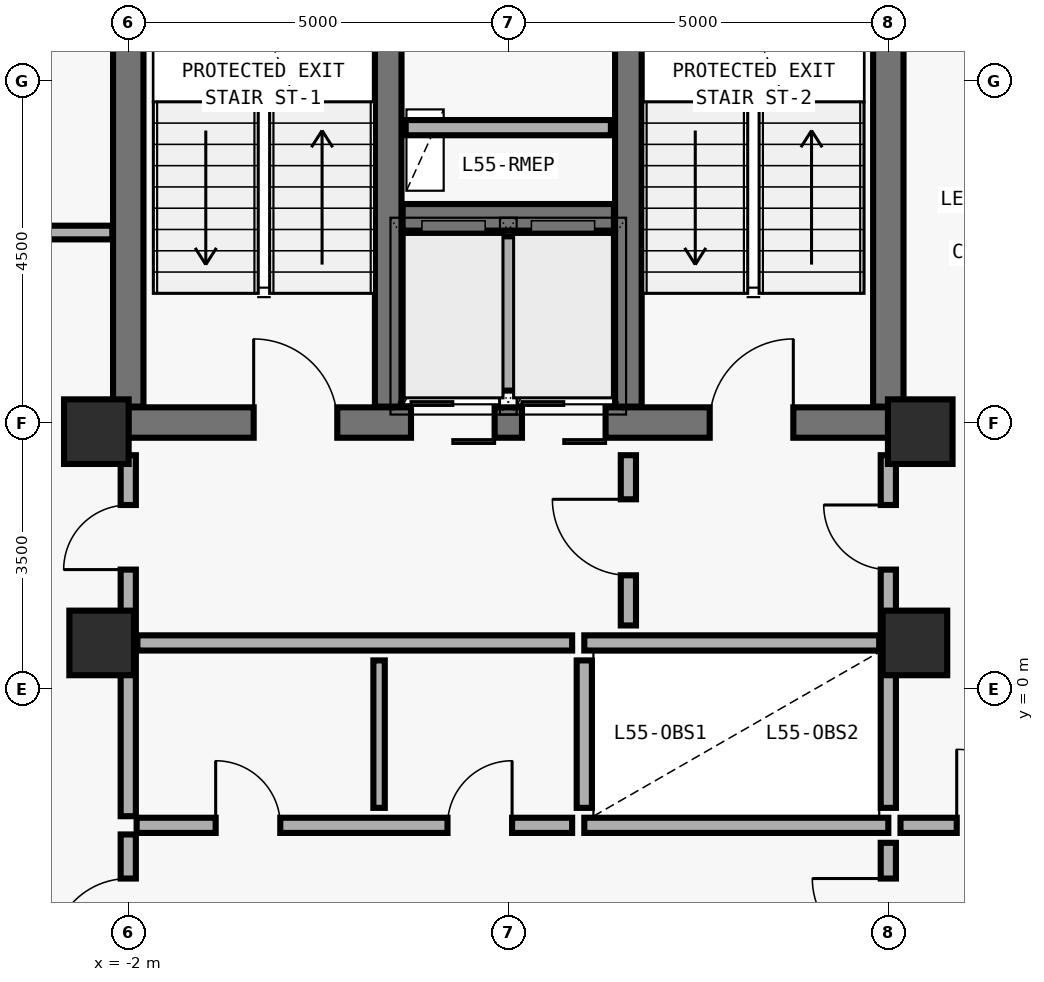
"""IFC4 building model, lengths in metres.
Left out: names, types, materials, properties, quantities, classifications, styles, units other than length and angle.
Written with IfcOpenShell. Run it as: python <this file> out.ifc"""

import sys

from ifc_helpers import new_model, si_unit, direction, frame, frame_2d, origin, origin_2d, place, context, subcontext, project, spatial, rectangle, extrude, element, fill, save


model = new_model("IFC4")
c1 = context("Model", 3, precision=1e-05, world=origin(), true_north=direction((0.0, 1.0)))
c2 = subcontext(c1, "Body", "Model", "MODEL_VIEW")
j1 = project(units=[si_unit("LENGTHUNIT", "METRE"), si_unit("PLANEANGLEUNIT", "RADIAN")], contexts=[c1])
p1 = place(None, origin())
s1 = spatial("IfcSite", under=j1, at=p1, CompositionType="ELEMENT")
p2 = place(p1, origin())
s2 = spatial("IfcBuilding", under=s1, at=p2, CompositionType="ELEMENT")
p3 = place(p2, frame((0.0, 0.0, 218.4)))
s3 = spatial("IfcBuildingStorey", under=s2, at=p3, CompositionType="ELEMENT", Elevation=218.4)
p4 = place(p3, frame((-2.0, 3.5, 0.0), z_axis=(0.0, 0.0, 1.0), x_axis=(1.0, 0.0, 0.0)))
e1 = element("IfcWall", 1, at=p4, inside=s3, PredefinedType="SHEAR", context=c2, shape_type="SweptSolid", body=[
    extrude(rectangle(XDim=10.0, YDim=0.4, at=frame_2d((5.0, 0.0))), origin(), (0.0, 0.0, 1.0), 3.592),
])
p5 = place(p4, frame((1.65, 0.0, 0.0)))
e2 = element("IfcOpeningElement", 2, at=p5, cuts=e1, PredefinedType="OPENING", context=c2, shape_type="SweptSolid", body=[
    extrude(rectangle(XDim=1.1, YDim=2.15, at=frame_2d((0.55, 1.075))), frame((0.0, 0.21, 0.0), z_axis=(0.0, -1.0, 0.0), x_axis=(1.0, 0.0, 0.0)), (0.0, 0.0, 1.0), 0.42),
])
p6 = place(p4, frame((7.65, 0.0, 0.0)))
e3 = element("IfcOpeningElement", 3, at=p6, cuts=e1, PredefinedType="OPENING", context=c2, shape_type="SweptSolid", body=[
    extrude(rectangle(XDim=1.1, YDim=2.15, at=frame_2d((0.55, 1.075))), frame((0.0, 0.21, 0.0), z_axis=(0.0, -1.0, 0.0), x_axis=(1.0, 0.0, 0.0)), (0.0, 0.0, 1.0), 0.42),
])
p7 = place(p4, frame((3.72, 0.0, 0.0)))
e4 = element("IfcOpeningElement", 4, at=p7, cuts=e1, PredefinedType="OPENING", context=c2, shape_type="SweptSolid", body=[
    extrude(rectangle(XDim=1.1, YDim=2.2, at=frame_2d((0.55, 1.1))), frame((0.0, 0.21, 0.0), z_axis=(0.0, -1.0, 0.0), x_axis=(1.0, 0.0, 0.0)), (0.0, 0.0, 1.0), 0.42),
])
p8 = place(p4, frame((5.18, 0.0, 0.0)))
e5 = element("IfcOpeningElement", 5, at=p8, cuts=e1, PredefinedType="OPENING", context=c2, shape_type="SweptSolid", body=[
    extrude(rectangle(XDim=1.1, YDim=2.2, at=frame_2d((0.55, 1.1))), frame((0.0, 0.21, 0.0), z_axis=(0.0, -1.0, 0.0), x_axis=(1.0, 0.0, 0.0)), (0.0, 0.0, 1.0), 0.42),
])
for number, where, z_axis, x_axis in (
    (6, (-2.0, 3.71, 0.0), (0.0, 0.0, 1.0), (0.0, 1.0, 0.0)),
    (7, (8.0, 3.71, 0.0), (0.0, 0.0, 1.0), (0.0, 1.0, 0.0)),
):
    element("IfcWall", number, at=place(p3, frame(where, z_axis=z_axis, x_axis=x_axis)), inside=s3, PredefinedType="SHEAR", context=c2, shape_type="SweptSolid", body=[
        extrude(rectangle(XDim=8.58, YDim=0.4, at=frame_2d((4.29, 0.0))), origin(), (0.0, 0.0, 1.0), 3.592),
    ])
for number, where, z_axis, x_axis in (
    (8, (1.42, 3.71, 0.0), (0.0, 0.0, 1.0), (0.0, 1.0, 0.0)),
    (9, (4.58, 3.71, 0.0), (0.0, 0.0, 1.0), (0.0, 1.0, 0.0)),
):
    element("IfcWall", number, at=place(p3, frame(where, z_axis=z_axis, x_axis=x_axis)), inside=s3, PredefinedType="SHEAR", context=c2, shape_type="SweptSolid", body=[
        extrude(rectangle(XDim=8.58, YDim=0.35, at=frame_2d((4.29, 0.0))), origin(), (0.0, 0.0, 1.0), 3.592),
    ])
p9 = place(p3, frame((1.61, 6.2, 0.0), z_axis=(0.0, 0.0, 1.0), x_axis=(1.0, 0.0, 0.0)))
e10 = element("IfcWall", 10, at=p9, inside=s3, PredefinedType="SHEAR", context=c2, shape_type="SweptSolid", body=[
    extrude(rectangle(XDim=2.78, YDim=0.35, at=frame_2d((1.39, 0.0))), origin(), (0.0, 0.0, 1.0), 3.592),
])
for number, where, z_axis, x_axis in (
    (11, (-2.42, 3.38, 0.0), (0.0, 0.0, 1.0), (1.0, 0.0, 0.0)),
    (12, (8.42, 3.38, 0.0), (0.0, 0.0, 1.0), (1.0, 0.0, 0.0)),
    (13, (-2.35, 0.6, 0.0), (0.0, 0.0, 1.0), (1.0, 0.0, 0.0)),
    (14, (8.35, 0.6, 0.0), (0.0, 0.0, 1.0), (1.0, 0.0, 0.0)),
):
    element("IfcColumn", number, at=place(p3, frame(where, z_axis=z_axis, x_axis=x_axis)), inside=s3, PredefinedType="COLUMN", context=c2, shape_type="SweptSolid", body=[
        extrude(rectangle(XDim=0.85, YDim=0.85, at=origin_2d()), origin(), (0.0, 0.0, 1.0), 3.575),
    ])
p10 = place(p3, frame((3.0, 3.92, 0.0), z_axis=(0.0, 0.0, 1.0), x_axis=(0.0, 1.0, 0.0)))
e15 = element("IfcWall", 15, at=p10, inside=s3, PredefinedType="SOLIDWALL", context=c2, shape_type="SweptSolid", body=[
    extrude(rectangle(XDim=2.03, YDim=0.2, at=frame_2d((1.015, 0.0))), origin(), (0.0, 0.0, 1.0), 3.36),
])
p11 = place(p3, frame((1.65, 7.38, 0.0), z_axis=(0.0, 0.0, 1.0), x_axis=(1.0, 0.0, 0.0)))
e16 = element("IfcWall", 16, at=p11, inside=s3, PredefinedType="SOLIDWALL", context=c2, shape_type="SweptSolid", body=[
    extrude(rectangle(XDim=2.7, YDim=0.2, at=frame_2d((1.35, 0.0))), origin(), (0.0, 0.0, 1.0), 3.36),
])
p12 = place(p3, frame((4.0, 0.6, 0.0), z_axis=(0.0, 0.0, 1.0), x_axis=(1.0, 0.0, 0.0)))
e17 = element("IfcWall", 17, at=p12, inside=s3, PredefinedType="SOLIDWALL", context=c2, shape_type="SweptSolid", body=[
    extrude(rectangle(XDim=3.88, YDim=0.2, at=frame_2d((1.94, 0.0))), origin(), (0.0, 0.0, 1.0), 3.012),
])
p13 = place(p3, frame((4.0, -1.8, 0.0), z_axis=(0.0, 0.0, 1.0), x_axis=(1.0, 0.0, 0.0)))
e18 = element("IfcWall", 18, at=p13, inside=s3, PredefinedType="SOLIDWALL", context=c2, shape_type="SweptSolid", body=[
    extrude(rectangle(XDim=4.0, YDim=0.2, at=frame_2d((2.0, 0.0))), origin(), (0.0, 0.0, 1.0), 3.36),
])
p14 = place(p3, frame((4.0, -1.57, 0.0), z_axis=(0.0, 0.0, 1.0), x_axis=(0.0, 1.0, 0.0)))
e19 = element("IfcWall", 19, at=p14, inside=s3, PredefinedType="SOLIDWALL", context=c2, shape_type="SweptSolid", body=[
    extrude(rectangle(XDim=1.94, YDim=0.2, at=frame_2d((0.97, 0.0))), origin(), (0.0, 0.0, 1.0), 3.36),
])
p15 = place(p3, frame((8.0, -1.57, 0.0), z_axis=(0.0, 0.0, 1.0), x_axis=(0.0, 1.0, 0.0)))
e20 = element("IfcWall", 20, at=p15, inside=s3, PredefinedType="SOLIDWALL", context=c2, shape_type="SweptSolid", body=[
    extrude(rectangle(XDim=2.05, YDim=0.2, at=frame_2d((1.025, 0.0))), origin(), (0.0, 0.0, 1.0), 3.012),
])
p16 = place(p3, frame((4.58, 0.83, 0.0), z_axis=(0.0, 0.0, 1.0), x_axis=(0.0, 1.0, 0.0)))
e21 = element("IfcWall", 21, at=p16, inside=s3, PredefinedType="MOVABLE", context=c2, shape_type="SweptSolid", body=[
    extrude(rectangle(XDim=2.24, YDim=0.2, at=frame_2d((1.12, 0.0))), origin(), (0.0, 0.0, 1.0), 3.36),
])
p17 = place(p16, frame((0.66, 0.0, 0.0)))
e22 = element("IfcOpeningElement", 22, at=p17, cuts=e21, PredefinedType="OPENING", context=c2, shape_type="SweptSolid", body=[
    extrude(rectangle(XDim=1.0, YDim=2.1, at=frame_2d((0.5, 1.05))), frame((0.0, 0.11, 0.0), z_axis=(0.0, -1.0, 0.0), x_axis=(1.0, 0.0, 0.0)), (0.0, 0.0, 1.0), 0.22),
])
p18 = place(p3, frame((-2.0, 0.72, 0.0), z_axis=(0.0, 0.0, 1.0), x_axis=(0.0, 1.0, 0.0)))
e23 = element("IfcWall", 23, at=p18, inside=s3, PredefinedType="MOVABLE", context=c2, shape_type="SweptSolid", body=[
    extrude(rectangle(XDim=2.35, YDim=0.2, at=frame_2d((1.175, 0.0))), origin(), (0.0, 0.0, 1.0), 2.692),
])
p19 = place(p18, frame((0.845, 0.0, 0.0)))
e24 = element("IfcOpeningElement", 24, at=p19, cuts=e23, PredefinedType="OPENING", context=c2, shape_type="SweptSolid", body=[
    extrude(rectangle(XDim=0.85, YDim=2.1, at=frame_2d((0.425, 1.05))), frame((0.0, 0.11, 0.0), z_axis=(0.0, -1.0, 0.0), x_axis=(1.0, 0.0, 0.0)), (0.0, 0.0, 1.0), 0.22),
])
p20 = place(p3, frame((8.0, 0.72, 0.0), z_axis=(0.0, 0.0, 1.0), x_axis=(0.0, 1.0, 0.0)))
e25 = element("IfcWall", 25, at=p20, inside=s3, PredefinedType="MOVABLE", context=c2, shape_type="SweptSolid", body=[
    extrude(rectangle(XDim=2.35, YDim=0.2, at=frame_2d((1.175, 0.0))), origin(), (0.0, 0.0, 1.0), 2.692),
])
p21 = place(p20, frame((0.845, 0.0, 0.0)))
e26 = element("IfcOpeningElement", 26, at=p21, cuts=e25, PredefinedType="OPENING", context=c2, shape_type="SweptSolid", body=[
    extrude(rectangle(XDim=0.85, YDim=2.1, at=frame_2d((0.425, 1.05))), frame((0.0, 0.11, 0.0), z_axis=(0.0, -1.0, 0.0), x_axis=(1.0, 0.0, 0.0)), (0.0, 0.0, 1.0), 0.22),
])
p22 = place(p3, frame((-2.0, -4.08, 0.0), z_axis=(0.0, 0.0, 1.0), x_axis=(0.0, 1.0, 0.0)))
e27 = element("IfcWall", 27, at=p22, inside=s3, PredefinedType="MOVABLE", context=c2, shape_type="SweptSolid", body=[
    extrude(rectangle(XDim=2.16, YDim=0.2, at=frame_2d((1.08, 0.0))), origin(), (0.0, 0.0, 1.0), 3.012),
])
p23 = place(p22, frame((0.58, 0.0, 0.0)))
e28 = element("IfcOpeningElement", 28, at=p23, cuts=e27, PredefinedType="OPENING", context=c2, shape_type="SweptSolid", body=[
    extrude(rectangle(XDim=1.0, YDim=2.1, at=frame_2d((0.5, 1.05))), frame((0.0, 0.11, 0.0), z_axis=(0.0, -1.0, 0.0), x_axis=(1.0, 0.0, 0.0)), (0.0, 0.0, 1.0), 0.22),
])
p24 = place(p3, frame((8.0, -3.97, 0.0), z_axis=(0.0, 0.0, 1.0), x_axis=(0.0, 1.0, 0.0)))
e29 = element("IfcWall", 29, at=p24, inside=s3, PredefinedType="MOVABLE", context=c2, shape_type="SweptSolid", body=[
    extrude(rectangle(XDim=1.94, YDim=0.2, at=frame_2d((0.97, 0.0))), origin(), (0.0, 0.0, 1.0), 3.012),
])
p25 = place(p24, frame((0.47, 0.0, 0.0)))
e30 = element("IfcOpeningElement", 30, at=p25, cuts=e29, PredefinedType="OPENING", context=c2, shape_type="SweptSolid", body=[
    extrude(rectangle(XDim=1.0, YDim=2.1, at=frame_2d((0.5, 1.05))), frame((0.0, 0.11, 0.0), z_axis=(0.0, -1.0, 0.0), x_axis=(1.0, 0.0, 0.0)), (0.0, 0.0, 1.0), 0.22),
])
p26 = place(p3, frame((-1.89, -1.8, 0.0), z_axis=(0.0, 0.0, 1.0), x_axis=(1.0, 0.0, 0.0)))
e31 = element("IfcWall", 31, at=p26, inside=s3, PredefinedType="MOVABLE", context=c2, shape_type="SweptSolid", body=[
    extrude(rectangle(XDim=5.73, YDim=0.2, at=frame_2d((2.865, 0.0))), origin(), (0.0, 0.0, 1.0), 3.36),
])
p27 = place(p26, frame((1.04, 0.0, 0.0)))
e32 = element("IfcOpeningElement", 32, at=p27, cuts=e31, PredefinedType="OPENING", context=c2, shape_type="SweptSolid", body=[
    extrude(rectangle(XDim=0.85, YDim=2.1, at=frame_2d((0.425, 1.05))), frame((0.0, 0.11, 0.0), z_axis=(0.0, -1.0, 0.0), x_axis=(1.0, 0.0, 0.0)), (0.0, 0.0, 1.0), 0.22),
])
p28 = place(p26, frame((4.09, 0.0, 0.0)))
e33 = element("IfcOpeningElement", 33, at=p28, cuts=e31, PredefinedType="OPENING", context=c2, shape_type="SweptSolid", body=[
    extrude(rectangle(XDim=0.85, YDim=2.1, at=frame_2d((0.425, 1.05))), frame((0.0, 0.11, 0.0), z_axis=(0.0, -1.0, 0.0), x_axis=(1.0, 0.0, 0.0)), (0.0, 0.0, 1.0), 0.22),
])
p29 = place(p3, frame((8.16, -1.8, 0.0), z_axis=(0.0, 0.0, 1.0), x_axis=(1.0, 0.0, 0.0)))
e34 = element("IfcWall", 34, at=p29, inside=s3, PredefinedType="MOVABLE", context=c2, shape_type="SweptSolid", body=[
    extrude(rectangle(XDim=2.64, YDim=0.2, at=frame_2d((1.32, 0.0))), origin(), (0.0, 0.0, 1.0), 3.36),
])
p30 = place(p29, frame((0.74, 0.0, 0.0)))
e35 = element("IfcOpeningElement", 35, at=p30, cuts=e34, PredefinedType="OPENING", context=c2, shape_type="SweptSolid", body=[
    extrude(rectangle(XDim=1.0, YDim=2.1, at=frame_2d((0.5, 1.05))), frame((0.0, 0.11, 0.0), z_axis=(0.0, -1.0, 0.0), x_axis=(1.0, 0.0, 0.0)), (0.0, 0.0, 1.0), 0.22),
])
p31 = place(p3, frame((-1.88, 0.6, 0.0), z_axis=(0.0, 0.0, 1.0), x_axis=(1.0, 0.0, 0.0)))
e36 = element("IfcWall", 36, at=p31, inside=s3, PredefinedType="MOVABLE", context=c2, shape_type="SweptSolid", body=[
    extrude(rectangle(XDim=5.72, YDim=0.2, at=frame_2d((2.86, 0.0))), origin(), (0.0, 0.0, 1.0), 3.012),
])
p32 = place(p3, frame((1.3, -1.57, 0.0), z_axis=(0.0, 0.0, 1.0), x_axis=(0.0, 1.0, 0.0)))
e37 = element("IfcWall", 37, at=p32, inside=s3, PredefinedType="PARTITIONING", context=c2, shape_type="SweptSolid", body=[
    extrude(rectangle(XDim=1.94, YDim=0.15, at=frame_2d((0.97, 0.0))), origin(), (0.0, 0.0, 1.0), 3.36),
])
p33 = place(p3, frame((-2.0, -1.68, 0.0), z_axis=(0.0, 0.0, 1.0), x_axis=(0.0, 1.0, 0.0)))
e38 = element("IfcWall", 38, at=p33, inside=s3, PredefinedType="MOVABLE", context=c2, shape_type="SweptSolid", body=[
    extrude(rectangle(XDim=2.16, YDim=0.2, at=frame_2d((1.08, 0.0))), origin(), (0.0, 0.0, 1.0), 3.012),
])
p34 = place(p3, frame((-2.21, 6.0, 0.0), z_axis=(0.0, 0.0, 1.0), x_axis=(-1.0, 0.0, 0.0)))
e39 = element("IfcWall", 39, at=p34, inside=s3, PredefinedType="PLUMBINGWALL", context=c2, shape_type="SweptSolid", body=[
    extrude(rectangle(XDim=2.39, YDim=0.18, at=frame_2d((1.195, 0.0))), origin(), (0.0, 0.0, 1.0), 3.36),
])
p35 = place(p5, origin())
e40 = element("IfcDoor", 40, at=p35, inside=s3, OperationType="SINGLE_SWING_LEFT", PredefinedType="DOOR", context=c2, shape_type="SweptSolid", body=[
    extrude(rectangle(XDim=1.1, YDim=2.15, at=frame_2d((0.55, 1.075))), frame((0.0, 0.025, 0.0), z_axis=(0.0, -1.0, 0.0), x_axis=(1.0, 0.0, 0.0)), (0.0, 0.0, 1.0), 0.05),
])
fill(e2, e40)
p36 = place(p6, origin())
e41 = element("IfcDoor", 41, at=p36, inside=s3, OperationType="SINGLE_SWING_RIGHT", PredefinedType="DOOR", context=c2, shape_type="SweptSolid", body=[
    extrude(rectangle(XDim=1.1, YDim=2.15, at=frame_2d((0.55, 1.075))), frame((0.0, 0.025, 0.0), z_axis=(0.0, -1.0, 0.0), x_axis=(1.0, 0.0, 0.0)), (0.0, 0.0, 1.0), 0.05),
])
fill(e3, e41)
p37 = place(p7, origin())
e42 = element("IfcDoor", 42, at=p37, inside=s3, OperationType="DOUBLE_DOOR_SLIDING", PredefinedType="DOOR", context=c2, shape_type="SweptSolid", body=[
    extrude(rectangle(XDim=1.1, YDim=2.2, at=frame_2d((0.55, 1.1))), frame((0.0, 0.025, 0.0), z_axis=(0.0, -1.0, 0.0), x_axis=(1.0, 0.0, 0.0)), (0.0, 0.0, 1.0), 0.05),
])
fill(e4, e42)
p38 = place(p8, origin())
e43 = element("IfcDoor", 43, at=p38, inside=s3, OperationType="DOUBLE_DOOR_SLIDING", PredefinedType="DOOR", context=c2, shape_type="SweptSolid", body=[
    extrude(rectangle(XDim=1.1, YDim=2.2, at=frame_2d((0.55, 1.1))), frame((0.0, 0.025, 0.0), z_axis=(0.0, -1.0, 0.0), x_axis=(1.0, 0.0, 0.0)), (0.0, 0.0, 1.0), 0.05),
])
fill(e5, e43)
p39 = place(p17, origin())
e44 = element("IfcDoor", 44, at=p39, inside=s3, OperationType="SINGLE_SWING_RIGHT", PredefinedType="DOOR", context=c2, shape_type="SweptSolid", body=[
    extrude(rectangle(XDim=1.0, YDim=2.1, at=frame_2d((0.5, 1.05))), frame((0.0, 0.025, 0.0), z_axis=(0.0, -1.0, 0.0), x_axis=(1.0, 0.0, 0.0)), (0.0, 0.0, 1.0), 0.05),
])
fill(e22, e44)
p40 = place(p19, origin())
e45 = element("IfcDoor", 45, at=p40, inside=s3, OperationType="SINGLE_SWING_LEFT", PredefinedType="DOOR", context=c2, shape_type="SweptSolid", body=[
    extrude(rectangle(XDim=0.85, YDim=2.1, at=frame_2d((0.425, 1.05))), frame((0.0, 0.025, 0.0), z_axis=(0.0, -1.0, 0.0), x_axis=(1.0, 0.0, 0.0)), (0.0, 0.0, 1.0), 0.05),
])
fill(e24, e45)
p41 = place(p21, origin())
e46 = element("IfcDoor", 46, at=p41, inside=s3, OperationType="SINGLE_SWING_RIGHT", PredefinedType="DOOR", context=c2, shape_type="SweptSolid", body=[
    extrude(rectangle(XDim=0.85, YDim=2.1, at=frame_2d((0.425, 1.05))), frame((0.0, 0.025, 0.0), z_axis=(0.0, -1.0, 0.0), x_axis=(1.0, 0.0, 0.0)), (0.0, 0.0, 1.0), 0.05),
])
fill(e26, e46)
p42 = place(p23, origin())
e47 = element("IfcDoor", 47, at=p42, inside=s3, OperationType="SINGLE_SWING_LEFT", PredefinedType="DOOR", context=c2, shape_type="SweptSolid", body=[
    extrude(rectangle(XDim=1.0, YDim=2.1, at=frame_2d((0.5, 1.05))), frame((0.0, 0.025, 0.0), z_axis=(0.0, -1.0, 0.0), x_axis=(1.0, 0.0, 0.0)), (0.0, 0.0, 1.0), 0.05),
])
fill(e28, e47)
p43 = place(p25, origin())
e48 = element("IfcDoor", 48, at=p43, inside=s3, OperationType="SINGLE_SWING_RIGHT", PredefinedType="DOOR", context=c2, shape_type="SweptSolid", body=[
    extrude(rectangle(XDim=1.0, YDim=2.1, at=frame_2d((0.5, 1.05))), frame((0.0, 0.025, 0.0), z_axis=(0.0, -1.0, 0.0), x_axis=(1.0, 0.0, 0.0)), (0.0, 0.0, 1.0), 0.05),
])
fill(e30, e48)
p44 = place(p27, origin())
e49 = element("IfcDoor", 49, at=p44, inside=s3, OperationType="SINGLE_SWING_LEFT", PredefinedType="DOOR", context=c2, shape_type="SweptSolid", body=[
    extrude(rectangle(XDim=0.85, YDim=2.1, at=frame_2d((0.425, 1.05))), frame((0.0, 0.025, 0.0), z_axis=(0.0, -1.0, 0.0), x_axis=(1.0, 0.0, 0.0)), (0.0, 0.0, 1.0), 0.05),
])
fill(e32, e49)
p45 = place(p28, origin())
e50 = element("IfcDoor", 50, at=p45, inside=s3, OperationType="SINGLE_SWING_RIGHT", PredefinedType="DOOR", context=c2, shape_type="SweptSolid", body=[
    extrude(rectangle(XDim=0.85, YDim=2.1, at=frame_2d((0.425, 1.05))), frame((0.0, 0.025, 0.0), z_axis=(0.0, -1.0, 0.0), x_axis=(1.0, 0.0, 0.0)), (0.0, 0.0, 1.0), 0.05),
])
fill(e33, e50)
p46 = place(p30, origin())
e51 = element("IfcDoor", 51, at=p46, inside=s3, OperationType="SINGLE_SWING_LEFT", PredefinedType="DOOR", context=c2, shape_type="SweptSolid", body=[
    extrude(rectangle(XDim=1.0, YDim=2.1, at=frame_2d((0.5, 1.05))), frame((0.0, 0.025, 0.0), z_axis=(0.0, -1.0, 0.0), x_axis=(1.0, 0.0, 0.0)), (0.0, 0.0, 1.0), 0.05),
])
fill(e35, e51)
save(model, sys.argv[1])
